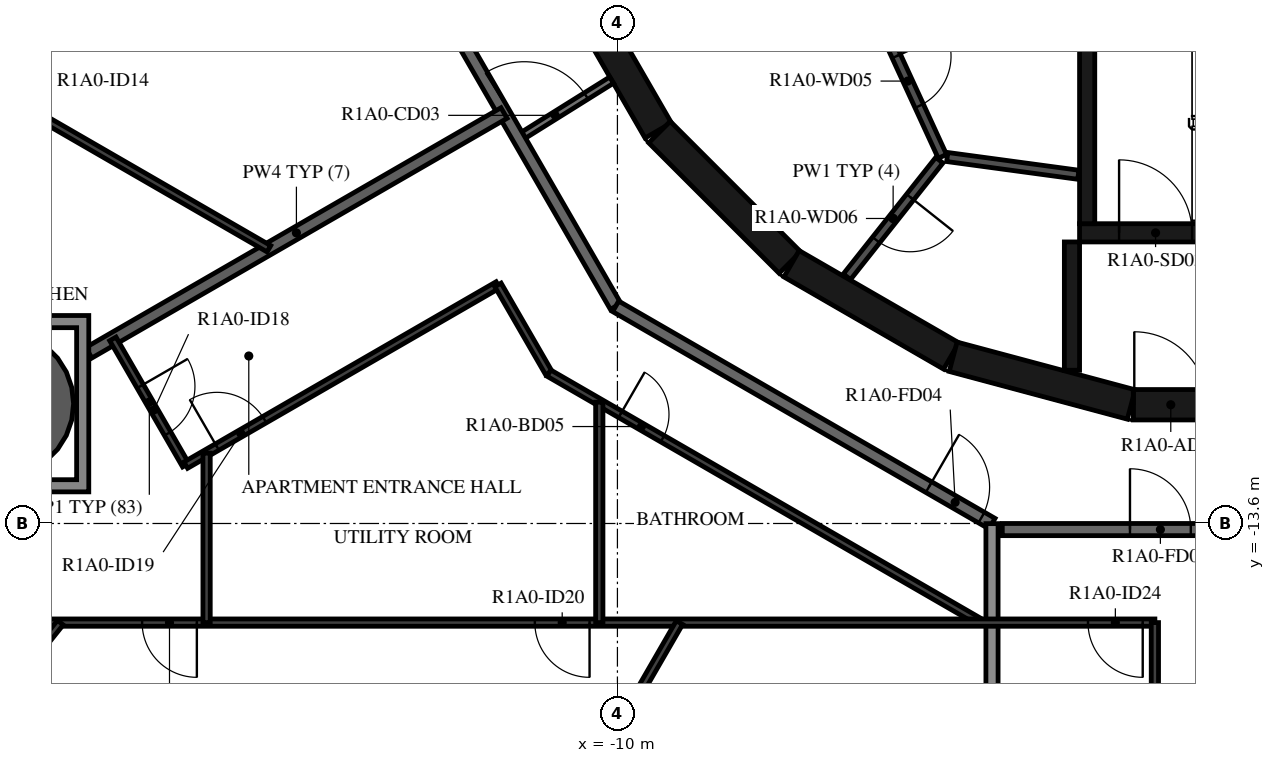
"""IFC4 building model, lengths in metres.
Left out: names, types, materials, properties, quantities, classifications, styles, units other than length and angle.
Written with IfcOpenShell. Run it as: python <this file> out.ifc"""

import sys

from ifc_helpers import new_model, si_unit, direction, frame, frame_2d, origin, origin_2d, place, context, subcontext, project, spatial, polyline, rectangle, hollow_circle, outline, extrude, element, fill, save


model = new_model("IFC4")
c1 = context("Model", 3, precision=1e-05, world=origin(), true_north=direction((0.0, 1.0)))
c2 = subcontext(c1, "Body", "Model", "MODEL_VIEW")
j1 = project(units=[si_unit("LENGTHUNIT", "METRE"), si_unit("PLANEANGLEUNIT", "RADIAN")], contexts=[c1])
p1 = place(None, origin())
s1 = spatial("IfcSite", under=j1, at=p1, CompositionType="ELEMENT")
p2 = place(p1, origin())
s2 = spatial("IfcBuilding", under=s1, at=p2, CompositionType="ELEMENT")
p3 = place(p2, frame((0.0, 0.0, 45.4)))
s3 = spatial("IfcBuildingStorey", under=s2, at=p3, CompositionType="ELEMENT", Elevation=45.4)
p4 = place(p3, frame((-20.144, -11.63, -0.38), z_axis=(0.0, 0.0, 1.0), x_axis=(1.0, 0.0, 0.0)))
e1 = element("IfcColumn", 1, at=p4, inside=s3, PredefinedType="COLUMN", context=c2, shape_type="SweptSolid", body=[
    extrude(hollow_circle(Radius=1.2, WallThickness=0.06, at=origin_2d()), origin(), (0.0, 0.0, 1.0), 3.5),
])
p5 = place(p3, frame((-10.845, -4.51, 0.0), z_axis=(0.0, 0.0, 1.0), x_axis=(0.500087131594, -0.865975092491, 0.0)))
e2 = element("IfcWall", 2, at=p5, inside=s3, PredefinedType="SHEAR", context=c2, shape_type="SweptSolid", body=[
    extrude(rectangle(XDim=3.033, YDim=0.5, at=frame_2d((1.516, 0.0))), origin(), (0.0, 0.0, 1.0), 3.12),
])
p6 = place(p3, frame((-9.308, -7.164, 0.0), z_axis=(0.0, 0.0, 1.0), x_axis=(0.707106781187, -0.707106781187, 0.0)))
e3 = element("IfcWall", 3, at=p6, inside=s3, PredefinedType="SHEAR", context=c2, shape_type="SweptSolid", body=[
    extrude(rectangle(XDim=3.032, YDim=0.5, at=frame_2d((1.516, 0.0))), origin(), (0.0, 0.0, 1.0), 3.12),
])
for number, where, z_axis, x_axis in (
    (4, (-7.137, -9.329, 0.0), (0.0, 0.0, 1.0), (0.866, -0.5, 0.0)),
    (5, (-4.479, -10.858, 0.0), (0.0, 0.0, 1.0), (0.966, -0.259, 0.0)),
):
    element("IfcWall", number, at=place(p3, frame(where, z_axis=z_axis, x_axis=x_axis)), inside=s3, PredefinedType="SHEAR", context=c2, shape_type="SweptSolid", body=[
        extrude(rectangle(XDim=3.033, YDim=0.5, at=frame_2d((1.516, 0.0))), origin(), (0.0, 0.0, 1.0), 3.12),
    ])
p7 = place(p3, frame((-1.516, -11.647, 0.0), z_axis=(0.0, 0.0, 1.0), x_axis=(1.0, 0.0, 0.0)))
e6 = element("IfcWall", 6, at=p7, inside=s3, PredefinedType="SHEAR", context=c2, shape_type="SweptSolid", body=[
    extrude(rectangle(XDim=3.033, YDim=0.5, at=frame_2d((1.516, 0.0))), origin(), (0.0, 0.0, 1.0), 3.12),
])
p8 = place(p7, frame((0.016, 0.0, 0.0)))
e7 = element("IfcOpeningElement", 7, at=p8, cuts=e6, PredefinedType="OPENING", context=c2, shape_type="SweptSolid", body=[
    extrude(rectangle(XDim=1.2, YDim=2.1, at=frame_2d((0.6, 1.05))), frame((0.0, 0.26, 0.0), z_axis=(0.0, -1.0, 0.0), x_axis=(1.0, 0.0, 0.0)), (0.0, 0.0, 1.0), 0.52),
])
p9 = place(p3, frame((-2.275, -8.67, 0.0), z_axis=(0.0, 0.0, 1.0), x_axis=(0.0, 1.0, 0.0)))
e8 = element("IfcWall", 8, at=p9, inside=s3, PredefinedType="SHEAR", context=c2, shape_type="SweptSolid", body=[
    extrude(rectangle(XDim=3.32, YDim=0.25, at=frame_2d((1.66, 0.0))), origin(), (0.0, 0.0, 1.0), 3.12),
])
p10 = place(p3, frame((-2.4, -8.82, 0.0), z_axis=(0.0, 0.0, 1.0), x_axis=(1.0, 0.0, 0.0)))
e9 = element("IfcWall", 9, at=p10, inside=s3, PredefinedType="SHEAR", context=c2, shape_type="SweptSolid", body=[
    extrude(rectangle(XDim=2.5, YDim=0.3, at=frame_2d((1.25, 0.0))), origin(), (0.0, 0.0, 1.0), 3.12),
])
p11 = place(p10, frame((0.65, 0.0, 0.0)))
e10 = element("IfcOpeningElement", 10, at=p11, cuts=e9, PredefinedType="OPENING", context=c2, shape_type="SweptSolid", body=[
    extrude(rectangle(XDim=1.2, YDim=2.1, at=frame_2d((0.6, 1.05))), frame((0.0, 0.16, 0.0), z_axis=(0.0, -1.0, 0.0), x_axis=(1.0, 0.0, 0.0)), (0.0, 0.0, 1.0), 0.32),
])
p12 = place(p3, frame((-2.525, -8.97, 0.0), z_axis=(0.0, 0.0, 1.0), x_axis=(0.0, -1.0, 0.0)))
e11 = element("IfcWall", 11, at=p12, inside=s3, PredefinedType="SHEAR", context=c2, shape_type="SweptSolid", body=[
    extrude(rectangle(XDim=2.11, YDim=0.25, at=frame_2d((1.055, 0.0))), origin(), (0.0, 0.0, 1.0), 3.12),
])
p13 = place(p3, frame((-5.795, -5.086, 0.0), z_axis=(0.0, 0.0, 1.0), x_axis=(0.417887867606, -0.908498613157, 0.0)))
e12 = element("IfcWall", 12, at=p13, inside=s3, PredefinedType="PARTITIONING", context=c2, shape_type="SweptSolid", body=[
    extrude(rectangle(XDim=2.726, YDim=0.15, at=frame_2d((1.363, 0.0))), origin(), (0.0, 0.0, 1.0), 3.12),
])
p14 = place(p13, frame((0.913, 0.0, 0.0)))
e13 = element("IfcOpeningElement", 13, at=p14, cuts=e12, PredefinedType="OPENING", context=c2, shape_type="SweptSolid", body=[
    extrude(rectangle(XDim=0.9, YDim=2.1, at=frame_2d((0.45, 1.05))), frame((0.0, 0.085, 0.0), z_axis=(0.0, -1.0, 0.0), x_axis=(1.0, 0.0, 0.0)), (0.0, 0.0, 1.0), 0.17),
])
p15 = place(p3, frame((-4.706, -7.625, 0.0), z_axis=(0.0, 0.0, 1.0), x_axis=(-0.621392599334, -0.783499353856, 0.0)))
e14 = element("IfcWall", 14, at=p15, inside=s3, PredefinedType="PARTITIONING", context=c2, shape_type="SweptSolid", body=[
    extrude(rectangle(XDim=2.447, YDim=0.15, at=frame_2d((1.224, 0.0))), origin(), (0.0, 0.0, 1.0), 3.12),
])
p16 = place(p15, frame((0.774, 0.0, 0.0)))
e15 = element("IfcOpeningElement", 15, at=p16, cuts=e14, PredefinedType="OPENING", context=c2, shape_type="SweptSolid", body=[
    extrude(rectangle(XDim=0.9, YDim=2.1, at=frame_2d((0.45, 1.05))), frame((0.0, 0.085, 0.0), z_axis=(0.0, -1.0, 0.0), x_axis=(1.0, 0.0, 0.0)), (0.0, 0.0, 1.0), 0.17),
])
p17 = place(p3, frame((-2.42, -7.865, 0.0), z_axis=(0.0, 0.0, 1.0), x_axis=(-0.990972299108, 0.134066783362, 0.0)))
e16 = element("IfcWall", 16, at=p17, inside=s3, PredefinedType="PARTITIONING", context=c2, shape_type="SweptSolid", body=[
    extrude(rectangle(XDim=2.176, YDim=0.15, at=frame_2d((1.088, 0.0))), origin(), (0.0, 0.0, 1.0), 3.12),
])
p18 = place(p3, frame((-11.625, -7.264, 0.0), z_axis=(0.0, 0.0, 1.0), x_axis=(0.84803632456, 0.529938102259, 0.0)))
e17 = element("IfcWall", 17, at=p18, inside=s3, PredefinedType="PARTITIONING", context=c2, shape_type="SweptSolid", body=[
    extrude(rectangle(XDim=1.804, YDim=0.12, at=frame_2d((0.902, 0.0))), origin(), (0.0, 0.0, 1.0), 3.12),
])
p19 = place(p18, frame((0.11, 0.0, 0.0)))
e18 = element("IfcOpeningElement", 18, at=p19, cuts=e17, PredefinedType="OPENING", context=c2, shape_type="SweptSolid", body=[
    extrude(rectangle(XDim=1.2, YDim=2.1, at=frame_2d((0.6, 1.05))), frame((0.0, 0.07, 0.0), z_axis=(0.0, -1.0, 0.0), x_axis=(1.0, 0.0, 0.0)), (0.0, 0.0, 1.0), 0.14),
])
p20 = place(p3, frame((-13.7, -3.671, 0.0), z_axis=(0.0, 0.0, 1.0), x_axis=(0.500001669485, -0.866024439905, 0.0)))
e19 = element("IfcWall", 19, at=p20, inside=s3, PredefinedType="STANDARD", context=c2, shape_type="SweptSolid", body=[
    extrude(rectangle(XDim=7.342, YDim=0.2, at=frame_2d((3.671, 0.0))), origin(), (0.0, 0.0, 1.0), 3.12),
])
p21 = place(p3, frame((-10.029, -10.029, 0.0), z_axis=(0.0, 0.0, 1.0), x_axis=(0.866022878987, -0.500004373052, 0.0)))
e20 = element("IfcWall", 20, at=p21, inside=s3, PredefinedType="STANDARD", context=c2, shape_type="SweptSolid", body=[
    extrude(rectangle(XDim=7.146, YDim=0.2, at=frame_2d((3.573, 0.0))), origin(), (0.0, 0.0, 1.0), 3.12),
])
p22 = place(p21, frame((5.947, 0.0, 0.0)))
e21 = element("IfcOpeningElement", 21, at=p22, cuts=e20, PredefinedType="OPENING", context=c2, shape_type="SweptSolid", body=[
    extrude(rectangle(XDim=1.0, YDim=2.1, at=frame_2d((0.5, 1.05))), frame((0.0, 0.11, 0.0), z_axis=(0.0, -1.0, 0.0), x_axis=(1.0, 0.0, 0.0)), (0.0, 0.0, 1.0), 0.22),
])
p23 = place(p3, frame((-3.671, -13.7, 0.0), z_axis=(0.0, 0.0, 1.0), x_axis=(1.0, 0.0, 0.0)))
e22 = element("IfcWall", 22, at=p23, inside=s3, PredefinedType="STANDARD", context=c2, shape_type="SweptSolid", body=[
    extrude(rectangle(XDim=7.342, YDim=0.2, at=frame_2d((3.671, 0.0))), origin(), (0.0, 0.0, 1.0), 3.12),
])
p24 = place(p23, frame((2.1, 0.0, 0.0)))
e23 = element("IfcOpeningElement", 23, at=p24, cuts=e22, PredefinedType="OPENING", context=c2, shape_type="SweptSolid", body=[
    extrude(rectangle(XDim=1.0, YDim=2.1, at=frame_2d((0.5, 1.05))), frame((0.0, 0.11, 0.0), z_axis=(0.0, -1.0, 0.0), x_axis=(1.0, 0.0, 0.0)), (0.0, 0.0, 1.0), 0.22),
])
p25 = place(p3, frame((-18.694, -10.793, 0.0), z_axis=(0.0, 0.0, 1.0), x_axis=(0.86603400694, 0.499985098601, 0.0)))
e24 = element("IfcWall", 24, at=p25, inside=s3, PredefinedType="STANDARD", context=c2, shape_type="SweptSolid", body=[
    extrude(rectangle(XDim=7.885, YDim=0.2, at=frame_2d((3.943, 0.0))), origin(), (0.0, 0.0, 1.0), 3.12),
])
p26 = place(p3, frame((-3.84, -19.63, 0.0), z_axis=(0.0, 0.0, 1.0), x_axis=(0.0, 1.0, 0.0)))
e25 = element("IfcWall", 25, at=p26, inside=s3, PredefinedType="STANDARD", context=c2, shape_type="SweptSolid", body=[
    extrude(rectangle(XDim=6.028, YDim=0.2, at=frame_2d((3.014, 0.0))), origin(), (0.0, 0.0, 1.0), 2.73),
])
p27 = place(p3, frame((-17.313, 0.472, 0.0), z_axis=(0.0, 0.0, 1.0), x_axis=(-0.499999047218, -0.866025953873, 0.0)))
e26 = element("IfcWall", 26, at=p27, inside=s3, PredefinedType="PARTITIONING", context=c2, shape_type="SweptSolid", body=[
    extrude(rectangle(XDim=11.639, YDim=0.12, at=frame_2d((5.82, 0.0))), origin(), (0.0, 0.0, 1.0), 3.12),
])
p28 = place(p27, frame((1.132, 0.0, 0.0)))
e27 = element("IfcOpeningElement", 27, at=p28, cuts=e26, PredefinedType="OPENING", context=c2, shape_type="SweptSolid", body=[
    extrude(rectangle(XDim=0.9, YDim=2.1, at=frame_2d((0.45, 1.05))), frame((0.0, 0.07, 0.0), z_axis=(0.0, -1.0, 0.0), x_axis=(1.0, 0.0, 0.0)), (0.0, 0.0, 1.0), 0.14),
])
p29 = place(p27, frame((8.083, 0.0, 0.0)))
e28 = element("IfcOpeningElement", 28, at=p29, cuts=e26, PredefinedType="OPENING", context=c2, shape_type="SweptSolid", body=[
    extrude(rectangle(XDim=0.9, YDim=2.1, at=frame_2d((0.45, 1.05))), frame((0.0, 0.07, 0.0), z_axis=(0.0, -1.0, 0.0), x_axis=(1.0, 0.0, 0.0)), (0.0, 0.0, 1.0), 0.14),
])
p30 = place(p3, frame((-21.055, -6.009, 0.0), z_axis=(0.0, 0.0, 1.0), x_axis=(0.866030172657, -0.49999173998, 0.0)))
e29 = element("IfcWall", 29, at=p30, inside=s3, PredefinedType="PARTITIONING", context=c2, shape_type="SweptSolid", body=[
    extrude(rectangle(XDim=6.147, YDim=0.12, at=frame_2d((3.074, 0.0))), origin(), (0.0, 0.0, 1.0), 3.12),
])
p31 = place(p30, frame((0.2, 0.0, 0.0)))
e30 = element("IfcOpeningElement", 30, at=p31, cuts=e29, PredefinedType="OPENING", context=c2, shape_type="SweptSolid", body=[
    extrude(rectangle(XDim=0.9, YDim=2.1, at=frame_2d((0.45, 1.05))), frame((0.0, 0.07, 0.0), z_axis=(0.0, -1.0, 0.0), x_axis=(1.0, 0.0, 0.0)), (0.0, 0.0, 1.0), 0.14),
])
p32 = place(p3, frame((-18.298, -10.564, 0.0), z_axis=(0.0, 0.0, 1.0), x_axis=(0.500048565365, -0.865997362742, 0.0)))
e31 = element("IfcWall", 31, at=p32, inside=s3, PredefinedType="PARTITIONING", context=c2, shape_type="SweptSolid", body=[
    extrude(rectangle(XDim=2.398, YDim=0.12, at=frame_2d((1.199, 0.0))), origin(), (0.0, 0.0, 1.0), 3.12),
])
p33 = place(p32, frame((0.9, 0.0, 0.0)))
e32 = element("IfcOpeningElement", 32, at=p33, cuts=e31, PredefinedType="OPENING", context=c2, shape_type="SweptSolid", body=[
    extrude(rectangle(XDim=0.9, YDim=2.1, at=frame_2d((0.45, 1.05))), frame((0.0, 0.07, 0.0), z_axis=(0.0, -1.0, 0.0), x_axis=(1.0, 0.0, 0.0)), (0.0, 0.0, 1.0), 0.14),
])
p34 = place(p3, frame((-17.099, -12.641, 0.0), z_axis=(0.0, 0.0, 1.0), x_axis=(0.866027165828, 0.499996948039, 0.0)))
e33 = element("IfcWall", 33, at=p34, inside=s3, PredefinedType="PARTITIONING", context=c2, shape_type="SweptSolid", body=[
    extrude(rectangle(XDim=5.928, YDim=0.12, at=frame_2d((2.964, 0.0))), origin(), (0.0, 0.0, 1.0), 3.12),
])
p35 = place(p34, frame((0.595, 0.0, 0.0)))
e34 = element("IfcOpeningElement", 34, at=p35, cuts=e33, PredefinedType="OPENING", context=c2, shape_type="SweptSolid", body=[
    extrude(rectangle(XDim=0.9, YDim=2.1, at=frame_2d((0.45, 1.05))), frame((0.0, 0.07, 0.0), z_axis=(0.0, -1.0, 0.0), x_axis=(1.0, 0.0, 0.0)), (0.0, 0.0, 1.0), 0.14),
])
p36 = place(p3, frame((-11.965, -9.677, 0.0), z_axis=(0.0, 0.0, 1.0), x_axis=(0.499932737185, -0.866064234506, 0.0)))
e35 = element("IfcWall", 35, at=p36, inside=s3, PredefinedType="PARTITIONING", context=c2, shape_type="SweptSolid", body=[
    extrude(rectangle(XDim=1.675, YDim=0.12, at=frame_2d((0.837, 0.0))), origin(), (0.0, 0.0, 1.0), 3.12),
])
p37 = place(p3, frame((-11.127, -11.127, 0.0), z_axis=(0.0, 0.0, 1.0), x_axis=(0.866032360344, -0.499987950692, 0.0)))
e36 = element("IfcWall", 36, at=p37, inside=s3, PredefinedType="PARTITIONING", context=c2, shape_type="SweptSolid", body=[
    extrude(rectangle(XDim=8.146, YDim=0.12, at=frame_2d((4.073, 0.0))), origin(), (0.0, 0.0, 1.0), 3.12),
])
p38 = place(p37, frame((1.357, 0.0, 0.0)))
e37 = element("IfcOpeningElement", 37, at=p38, cuts=e36, PredefinedType="OPENING", context=c2, shape_type="SweptSolid", body=[
    extrude(rectangle(XDim=0.8, YDim=2.1, at=frame_2d((0.4, 1.05))), frame((0.0, 0.07, 0.0), z_axis=(0.0, -1.0, 0.0), x_axis=(1.0, 0.0, 0.0)), (0.0, 0.0, 1.0), 0.14),
])
p39 = place(p3, frame((-1.161, -15.23, 0.0), z_axis=(0.0, 0.0, 1.0), x_axis=(-1.0, 0.0, 0.0)))
e38 = element("IfcWall", 38, at=p39, inside=s3, PredefinedType="PARTITIONING", context=c2, shape_type="SweptSolid", body=[
    extrude(rectangle(XDim=18.726, YDim=0.12, at=frame_2d((9.363, 0.0))), origin(), (0.0, 0.0, 1.0), 3.12),
])
p40 = place(p39, frame((9.297, 0.0, 0.0)))
e39 = element("IfcOpeningElement", 39, at=p40, cuts=e38, PredefinedType="OPENING", context=c2, shape_type="SweptSolid", body=[
    extrude(rectangle(XDim=0.9, YDim=2.1, at=frame_2d((0.45, 1.05))), frame((0.0, 0.07, 0.0), z_axis=(0.0, -1.0, 0.0), x_axis=(1.0, 0.0, 0.0)), (0.0, 0.0, 1.0), 0.14),
])
p41 = place(p39, frame((15.755, 0.0, 0.0)))
e40 = element("IfcOpeningElement", 40, at=p41, cuts=e38, PredefinedType="OPENING", context=c2, shape_type="SweptSolid", body=[
    extrude(rectangle(XDim=0.9, YDim=2.1, at=frame_2d((0.45, 1.05))), frame((0.0, 0.07, 0.0), z_axis=(0.0, -1.0, 0.0), x_axis=(1.0, 0.0, 0.0)), (0.0, 0.0, 1.0), 0.14),
])
p42 = place(p39, frame((0.2, 0.0, 0.0)))
e41 = element("IfcOpeningElement", 41, at=p42, cuts=e38, PredefinedType="OPENING", context=c2, shape_type="SweptSolid", body=[
    extrude(rectangle(XDim=0.9, YDim=2.1, at=frame_2d((0.45, 1.05))), frame((0.0, 0.07, 0.0), z_axis=(0.0, -1.0, 0.0), x_axis=(1.0, 0.0, 0.0)), (0.0, 0.0, 1.0), 0.14),
])
p43 = place(p3, frame((-22.381, -19.271, 0.0), z_axis=(0.0, 0.0, 1.0), x_axis=(0.623126488551, 0.782121077114, 0.0)))
e42 = element("IfcWall", 42, at=p43, inside=s3, PredefinedType="PARTITIONING", context=c2, shape_type="SweptSolid", body=[
    extrude(rectangle(XDim=5.167, YDim=0.12, at=frame_2d((2.583, 0.0))), origin(), (0.0, 0.0, 1.0), 3.12),
])
p44 = place(p43, frame((0.4, 0.0, 0.0)))
e43 = element("IfcOpeningElement", 43, at=p44, cuts=e42, PredefinedType="OPENING", context=c2, shape_type="SweptSolid", body=[
    extrude(rectangle(XDim=0.9, YDim=2.1, at=frame_2d((0.45, 1.05))), frame((0.0, 0.07, 0.0), z_axis=(0.0, -1.0, 0.0), x_axis=(1.0, 0.0, 0.0)), (0.0, 0.0, 1.0), 0.14),
])
p45 = place(p3, frame((-16.756, -15.23, 0.0), z_axis=(0.0, 0.0, 1.0), x_axis=(0.0, 1.0, 0.0)))
e44 = element("IfcWall", 44, at=p45, inside=s3, PredefinedType="PARTITIONING", context=c2, shape_type="SweptSolid", body=[
    extrude(rectangle(XDim=2.787, YDim=0.12, at=frame_2d((1.394, 0.0))), origin(), (0.0, 0.0, 1.0), 3.12),
])
p46 = place(p3, frame((-10.298, -15.23, 0.0), z_axis=(0.0, 0.0, 1.0), x_axis=(0.0, 1.0, 0.0)))
e45 = element("IfcWall", 45, at=p46, inside=s3, PredefinedType="PARTITIONING", context=c2, shape_type="SweptSolid", body=[
    extrude(rectangle(XDim=3.624, YDim=0.12, at=frame_2d((1.812, 0.0))), origin(), (0.0, 0.0, 1.0), 3.12),
])
p47 = place(p3, frame((-11.52, -19.63, 0.0), z_axis=(0.0, 0.0, 1.0), x_axis=(0.499999763888, 0.866025540104, 0.0)))
e46 = element("IfcWall", 46, at=p47, inside=s3, PredefinedType="PARTITIONING", context=c2, shape_type="SweptSolid", body=[
    extrude(rectangle(XDim=5.081, YDim=0.12, at=frame_2d((2.54, 0.0))), origin(), (0.0, 0.0, 1.0), 3.12),
])
p48 = place(p47, frame((0.4, 0.0, 0.0)))
e47 = element("IfcOpeningElement", 47, at=p48, cuts=e46, PredefinedType="OPENING", context=c2, shape_type="SweptSolid", body=[
    extrude(rectangle(XDim=0.9, YDim=2.1, at=frame_2d((0.45, 1.05))), frame((0.0, 0.07, 0.0), z_axis=(0.0, -1.0, 0.0), x_axis=(1.0, 0.0, 0.0)), (0.0, 0.0, 1.0), 0.14),
])
p49 = place(p3, frame((-1.161, -15.23, 0.0), z_axis=(0.0, 0.0, 1.0), x_axis=(0.0, -1.0, 0.0)))
e48 = element("IfcWall", 48, at=p49, inside=s3, PredefinedType="PARTITIONING", context=c2, shape_type="SweptSolid", body=[
    extrude(rectangle(XDim=2.615, YDim=0.12, at=frame_2d((1.308, 0.0))), origin(), (0.0, 0.0, 1.0), 3.12),
])
p50 = place(p3, origin())
e49 = element("IfcWall", 49, at=p50, inside=s3, PredefinedType="STANDARD", context=c2, shape_type="SweptSolid", body=[
    extrude(outline(polyline([(-18.694, -10.18), (-18.694, -13.08), (-21.594, -13.08), (-21.594, -10.18), (-18.694, -10.18)]), holes=[polyline([(-21.394, -12.88), (-18.894, -12.88), (-18.894, -10.38), (-21.394, -10.38), (-21.394, -12.88)])]), origin(), (0.0, 0.0, 1.0), 3.12),
])
p51 = place(p11, origin())
e50 = element("IfcDoor", 50, at=p51, inside=s3, OperationType="SINGLE_SWING_LEFT", PredefinedType="DOOR", context=c2, shape_type="SweptSolid", body=[
    extrude(rectangle(XDim=1.2, YDim=2.1, at=frame_2d((0.6, 1.05))), frame((0.0, 0.025, 0.0), z_axis=(0.0, -1.0, 0.0), x_axis=(1.0, 0.0, 0.0)), (0.0, 0.0, 1.0), 0.05),
])
fill(e10, e50)
p52 = place(p8, origin())
e51 = element("IfcDoor", 51, at=p52, inside=s3, OperationType="SINGLE_SWING_RIGHT", PredefinedType="DOOR", context=c2, shape_type="SweptSolid", body=[
    extrude(rectangle(XDim=1.2, YDim=2.1, at=frame_2d((0.6, 1.05))), frame((0.0, 0.025, 0.0), z_axis=(0.0, -1.0, 0.0), x_axis=(1.0, 0.0, 0.0)), (0.0, 0.0, 1.0), 0.05),
])
fill(e7, e51)
p53 = place(p14, origin())
e52 = element("IfcDoor", 52, at=p53, inside=s3, OperationType="SINGLE_SWING_RIGHT", PredefinedType="DOOR", context=c2, shape_type="SweptSolid", body=[
    extrude(rectangle(XDim=0.9, YDim=2.1, at=frame_2d((0.45, 1.05))), frame((0.0, 0.025, 0.0), z_axis=(0.0, -1.0, 0.0), x_axis=(1.0, 0.0, 0.0)), (0.0, 0.0, 1.0), 0.05),
])
fill(e13, e52)
p54 = place(p16, origin())
e53 = element("IfcDoor", 53, at=p54, inside=s3, OperationType="SINGLE_SWING_LEFT", PredefinedType="DOOR", context=c2, shape_type="SweptSolid", body=[
    extrude(rectangle(XDim=0.9, YDim=2.1, at=frame_2d((0.45, 1.05))), frame((0.0, 0.025, 0.0), z_axis=(0.0, -1.0, 0.0), x_axis=(1.0, 0.0, 0.0)), (0.0, 0.0, 1.0), 0.05),
])
fill(e15, e53)
p55 = place(p22, origin())
e54 = element("IfcDoor", 54, at=p55, inside=s3, OperationType="SINGLE_SWING_LEFT", PredefinedType="DOOR", context=c2, shape_type="SweptSolid", body=[
    extrude(rectangle(XDim=1.0, YDim=2.1, at=frame_2d((0.5, 1.05))), frame((0.0, 0.025, 0.0), z_axis=(0.0, -1.0, 0.0), x_axis=(1.0, 0.0, 0.0)), (0.0, 0.0, 1.0), 0.05),
])
fill(e21, e54)
p56 = place(p33, origin())
e55 = element("IfcDoor", 55, at=p56, inside=s3, OperationType="SINGLE_SWING_LEFT", PredefinedType="DOOR", context=c2, shape_type="SweptSolid", body=[
    extrude(rectangle(XDim=0.9, YDim=2.1, at=frame_2d((0.45, 1.05))), frame((0.0, 0.025, 0.0), z_axis=(0.0, -1.0, 0.0), x_axis=(1.0, 0.0, 0.0)), (0.0, 0.0, 1.0), 0.05),
])
fill(e32, e55)
p57 = place(p35, origin())
e56 = element("IfcDoor", 56, at=p57, inside=s3, OperationType="SINGLE_SWING_LEFT", PredefinedType="DOOR", context=c2, shape_type="SweptSolid", body=[
    extrude(rectangle(XDim=0.9, YDim=2.1, at=frame_2d((0.45, 1.05))), frame((0.0, 0.025, 0.0), z_axis=(0.0, -1.0, 0.0), x_axis=(1.0, 0.0, 0.0)), (0.0, 0.0, 1.0), 0.05),
])
fill(e34, e56)
p58 = place(p38, origin())
e57 = element("IfcDoor", 57, at=p58, inside=s3, OperationType="SINGLE_SWING_LEFT", PredefinedType="DOOR", context=c2, shape_type="SweptSolid", body=[
    extrude(rectangle(XDim=0.8, YDim=2.1, at=frame_2d((0.4, 1.05))), frame((0.0, 0.025, 0.0), z_axis=(0.0, -1.0, 0.0), x_axis=(1.0, 0.0, 0.0)), (0.0, 0.0, 1.0), 0.05),
])
fill(e37, e57)
p59 = place(p40, origin())
e58 = element("IfcDoor", 58, at=p59, inside=s3, OperationType="SINGLE_SWING_LEFT", PredefinedType="DOOR", context=c2, shape_type="SweptSolid", body=[
    extrude(rectangle(XDim=0.9, YDim=2.1, at=frame_2d((0.45, 1.05))), frame((0.0, 0.025, 0.0), z_axis=(0.0, -1.0, 0.0), x_axis=(1.0, 0.0, 0.0)), (0.0, 0.0, 1.0), 0.05),
])
fill(e39, e58)
p60 = place(p41, origin())
e59 = element("IfcDoor", 59, at=p60, inside=s3, OperationType="SINGLE_SWING_RIGHT", PredefinedType="DOOR", context=c2, shape_type="SweptSolid", body=[
    extrude(rectangle(XDim=0.9, YDim=2.1, at=frame_2d((0.45, 1.05))), frame((0.0, 0.025, 0.0), z_axis=(0.0, -1.0, 0.0), x_axis=(1.0, 0.0, 0.0)), (0.0, 0.0, 1.0), 0.05),
])
fill(e40, e59)
p61 = place(p24, origin())
e60 = element("IfcDoor", 60, at=p61, inside=s3, OperationType="SINGLE_SWING_LEFT", PredefinedType="DOOR", context=c2, shape_type="SweptSolid", body=[
    extrude(rectangle(XDim=1.0, YDim=2.1, at=frame_2d((0.5, 1.05))), frame((0.0, 0.025, 0.0), z_axis=(0.0, -1.0, 0.0), x_axis=(1.0, 0.0, 0.0)), (0.0, 0.0, 1.0), 0.05),
])
fill(e23, e60)
p62 = place(p42, origin())
e61 = element("IfcDoor", 61, at=p62, inside=s3, OperationType="SINGLE_SWING_LEFT", PredefinedType="DOOR", context=c2, shape_type="SweptSolid", body=[
    extrude(rectangle(XDim=0.9, YDim=2.1, at=frame_2d((0.45, 1.05))), frame((0.0, 0.025, 0.0), z_axis=(0.0, -1.0, 0.0), x_axis=(1.0, 0.0, 0.0)), (0.0, 0.0, 1.0), 0.05),
])
fill(e41, e61)
p63 = place(p19, origin())
e62 = element("IfcDoor", 62, at=p63, inside=s3, OperationType="DOUBLE_DOOR_SINGLE_SWING", PredefinedType="DOOR", context=c2, shape_type="SweptSolid", body=[
    extrude(rectangle(XDim=1.2, YDim=2.1, at=frame_2d((0.6, 1.05))), frame((0.0, 0.025, 0.0), z_axis=(0.0, -1.0, 0.0), x_axis=(1.0, 0.0, 0.0)), (0.0, 0.0, 1.0), 0.05),
])
fill(e18, e62)
save(model, sys.argv[1])
